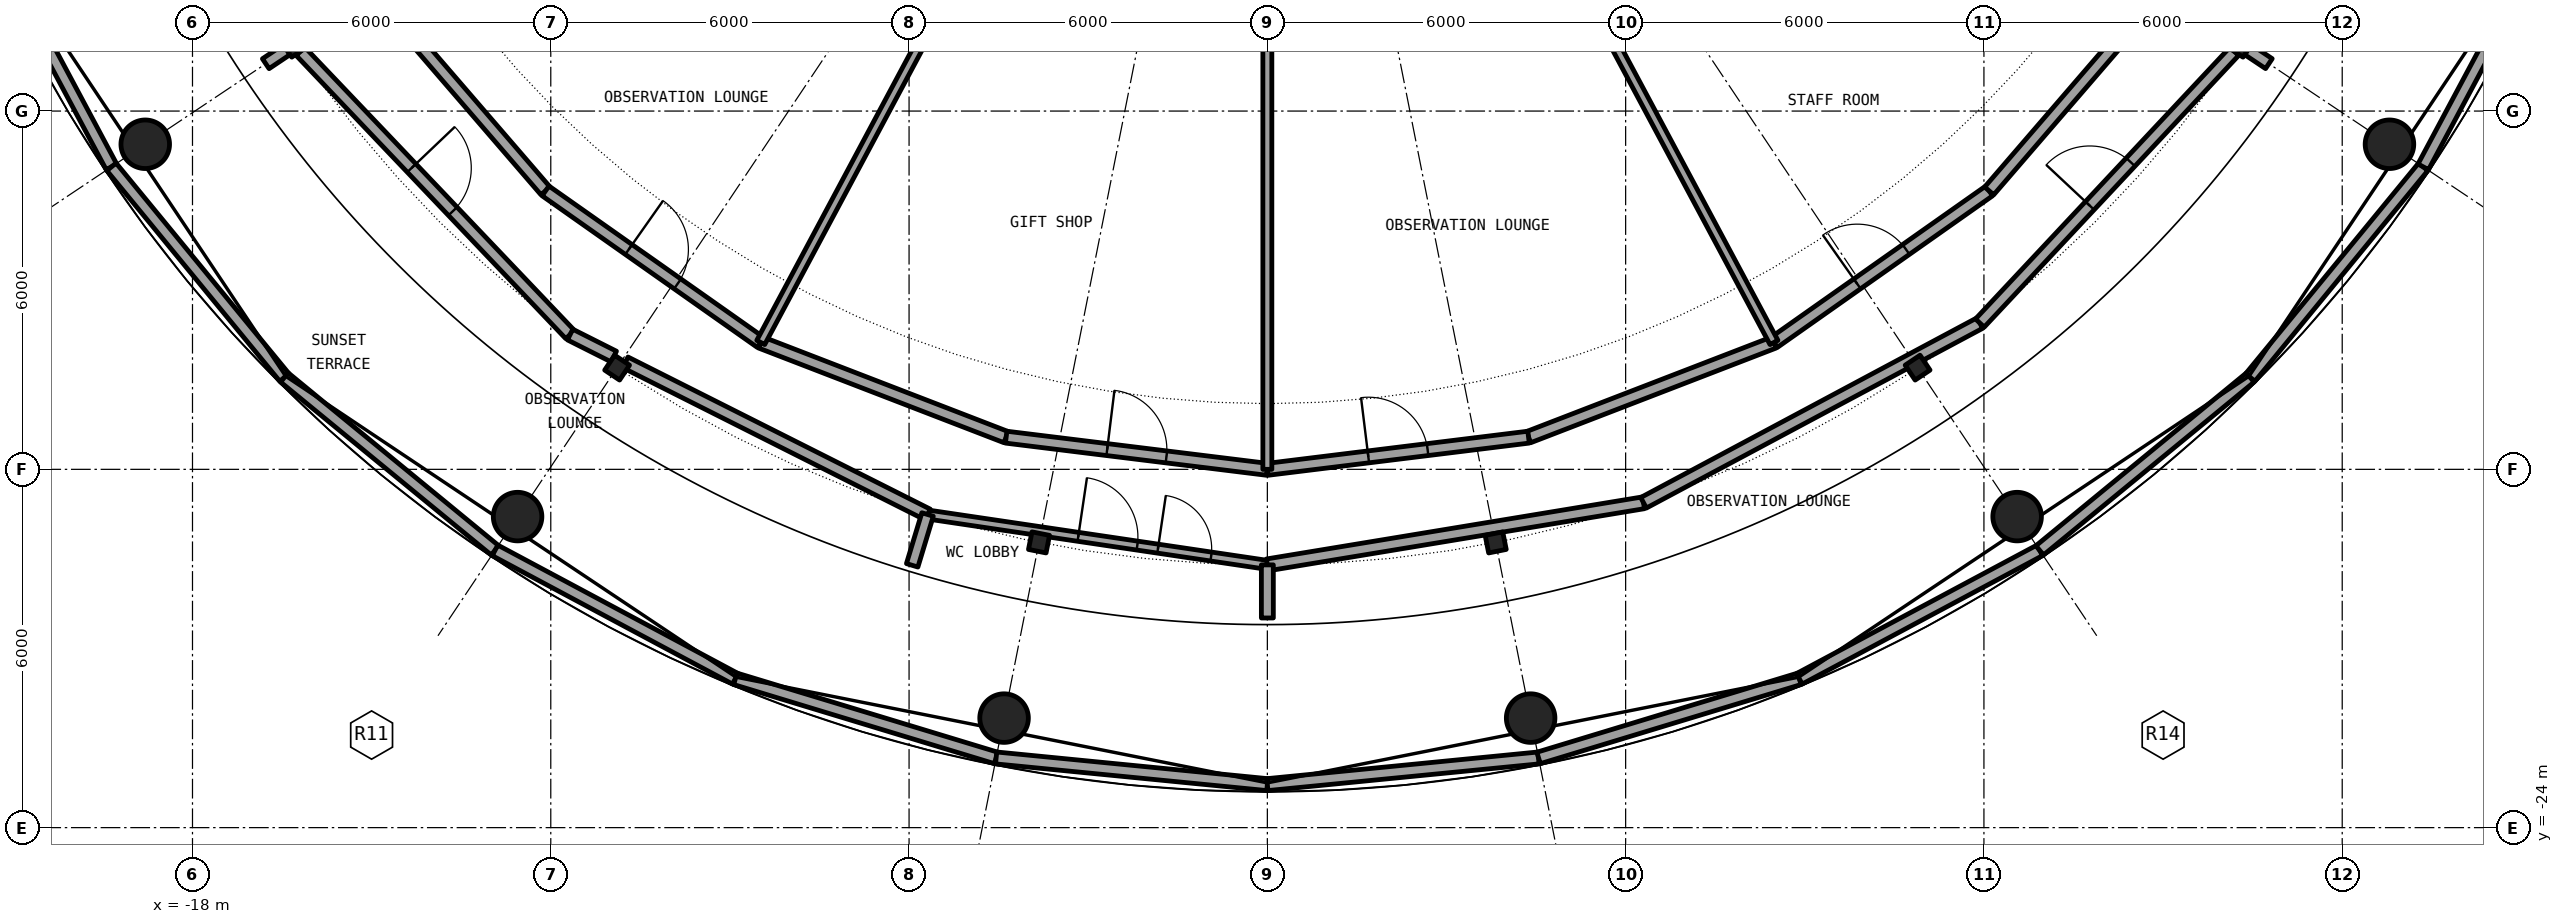
"""IFC4 building model, lengths in metres.
Left out: names, types, materials, properties, quantities, classifications, styles, units other than length and angle.
Written with IfcOpenShell. Run it as: python <this file> out.ifc"""

import sys

from ifc_helpers import new_model, si_unit, direction, frame, frame_2d, origin, origin_2d, place, context, subcontext, project, spatial, rectangle, hollow_circle, i_section, extrude, element, fill, save


model = new_model("IFC4")
c1 = context("Model", 3, precision=1e-05, world=origin(), true_north=direction((0.0, 1.0)))
c2 = subcontext(c1, "Body", "Model", "MODEL_VIEW")
j1 = project(units=[si_unit("LENGTHUNIT", "METRE"), si_unit("PLANEANGLEUNIT", "RADIAN")], contexts=[c1])
p1 = place(None, origin())
s1 = spatial("IfcSite", under=j1, at=p1, CompositionType="ELEMENT")
p2 = place(p1, origin())
s2 = spatial("IfcBuilding", under=s1, at=p2, CompositionType="ELEMENT")
p3 = place(p2, frame((0.0, 0.0, 255.4)))
s3 = spatial("IfcBuildingStorey", under=s2, at=p3, CompositionType="ELEMENT", Elevation=255.4)
for number, where, z_axis, x_axis in (
    (1, (-18.791, -12.556, 0.0), (0.0, 0.0, 1.0), (1.0, 0.0, 0.0)),
    (2, (-12.556, -18.791, 0.0), (0.0, 0.0, 1.0), (1.0, 0.0, 0.0)),
    (3, (-4.409, -22.166, 0.0), (0.0, 0.0, 1.0), (1.0, 0.0, 0.0)),
    (4, (4.409, -22.166, 0.0), (0.0, 0.0, 1.0), (1.0, 0.0, 0.0)),
    (5, (12.556, -18.791, 0.0), (0.0, 0.0, 1.0), (1.0, 0.0, 0.0)),
    (6, (18.791, -12.556, 0.0), (0.0, 0.0, 1.0), (1.0, 0.0, 0.0)),
):
    element("IfcColumn", number, at=place(p3, frame(where, z_axis=z_axis, x_axis=x_axis)), inside=s3, PredefinedType="COLUMN", context=c2, shape_type="SweptSolid", body=[
        extrude(hollow_circle(Radius=0.406, WallThickness=0.03, at=origin_2d()), origin(), (0.0, 0.0, 1.0), 6.1),
    ])
for number, where, z_axis, x_axis in (
    (7, (-16.297, -10.889, 0.0), (0.0, 0.0, 1.0), (-0.831, -0.556, 0.0)),
    (8, (-10.889, -16.297, 0.0), (0.0, 0.0, 1.0), (-0.556, -0.831, 0.0)),
    (9, (-3.824, -19.223, 0.0), (0.0, 0.0, 1.0), (-0.195, -0.981, 0.0)),
    (10, (3.824, -19.223, 0.0), (0.0, 0.0, 1.0), (0.195, -0.981, 0.0)),
    (11, (10.889, -16.297, 0.0), (0.0, 0.0, 1.0), (0.556, -0.831, 0.0)),
    (12, (16.297, -10.889, 0.0), (0.0, 0.0, 1.0), (0.831, -0.556, 0.0)),
):
    element("IfcColumn", number, at=place(p3, frame(where, z_axis=z_axis, x_axis=x_axis)), inside=s3, PredefinedType="COLUMN", context=c2, shape_type="SweptSolid", body=[
        extrude(i_section(OverallWidth=0.3, OverallDepth=0.3, WebThickness=0.011, FlangeThickness=0.019, FilletRadius=0.027, at=origin_2d()), origin(), (0.0, 0.0, 1.0), 6.1),
    ])
p4 = place(p3, frame((-21.508, -8.909, 6.1), z_axis=(0.0, 0.0, 1.0), x_axis=(0.471334945511, -0.881954289711, 0.0)))
e13 = element("IfcWall", 13, at=p4, inside=s3, PredefinedType="PARAPET", context=c2, shape_type="SweptSolid", body=[
    extrude(rectangle(XDim=4.564, YDim=0.2, at=frame_2d((2.282, 0.0))), origin(), (0.0, 0.0, 1.0), 1.1),
])
for number, where, z_axis, x_axis in (
    (14, (-19.357, -12.934, 6.1), (0.0, 0.0, 1.0), (0.635, -0.773, 0.0)),
    (15, (-16.461, -16.461, 6.1), (0.0, 0.0, 1.0), (0.773, -0.635, 0.0)),
):
    element("IfcWall", number, at=place(p3, frame(where, z_axis=z_axis, x_axis=x_axis)), inside=s3, PredefinedType="PARAPET", context=c2, shape_type="SweptSolid", body=[
        extrude(rectangle(XDim=4.563, YDim=0.2, at=frame_2d((2.282, 0.0))), origin(), (0.0, 0.0, 1.0), 1.1),
    ])
p5 = place(p3, frame((-12.934, -19.357, 6.1), z_axis=(0.0, 0.0, 1.0), x_axis=(0.881954289711, -0.471334945511, 0.0)))
e16 = element("IfcWall", 16, at=p5, inside=s3, PredefinedType="PARAPET", context=c2, shape_type="SweptSolid", body=[
    extrude(rectangle(XDim=4.564, YDim=0.2, at=frame_2d((2.282, 0.0))), origin(), (0.0, 0.0, 1.0), 1.1),
])
p6 = place(p3, frame((-8.909, -21.508, 6.1), z_axis=(0.0, 0.0, 1.0), x_axis=(0.956924910545, -0.29033552242, 0.0)))
e17 = element("IfcWall", 17, at=p6, inside=s3, PredefinedType="PARAPET", context=c2, shape_type="SweptSolid", body=[
    extrude(rectangle(XDim=4.563, YDim=0.2, at=frame_2d((2.282, 0.0))), origin(), (0.0, 0.0, 1.0), 1.1),
])
for number, where, z_axis, x_axis in (
    (18, (-4.542, -22.833, 6.1), (0.0, 0.0, 1.0), (0.995, -0.098, 0.0)),
    (19, (0.0, -23.28, 6.1), (0.0, 0.0, 1.0), (0.995, 0.098, 0.0)),
):
    element("IfcWall", number, at=place(p3, frame(where, z_axis=z_axis, x_axis=x_axis)), inside=s3, PredefinedType="PARAPET", context=c2, shape_type="SweptSolid", body=[
        extrude(rectangle(XDim=4.564, YDim=0.2, at=frame_2d((2.282, 0.0))), origin(), (0.0, 0.0, 1.0), 1.1),
    ])
p7 = place(p3, frame((4.542, -22.833, 6.1), z_axis=(0.0, 0.0, 1.0), x_axis=(0.956924910545, 0.29033552242, 0.0)))
e20 = element("IfcWall", 20, at=p7, inside=s3, PredefinedType="PARAPET", context=c2, shape_type="SweptSolid", body=[
    extrude(rectangle(XDim=4.563, YDim=0.2, at=frame_2d((2.282, 0.0))), origin(), (0.0, 0.0, 1.0), 1.1),
])
p8 = place(p3, frame((8.909, -21.508, 6.1), z_axis=(0.0, 0.0, 1.0), x_axis=(0.881954289711, 0.471334945511, 0.0)))
e21 = element("IfcWall", 21, at=p8, inside=s3, PredefinedType="PARAPET", context=c2, shape_type="SweptSolid", body=[
    extrude(rectangle(XDim=4.564, YDim=0.2, at=frame_2d((2.282, 0.0))), origin(), (0.0, 0.0, 1.0), 1.1),
])
for number, where, z_axis, x_axis in (
    (22, (12.934, -19.357, 6.1), (0.0, 0.0, 1.0), (0.773, 0.635, 0.0)),
    (23, (16.461, -16.461, 6.1), (0.0, 0.0, 1.0), (0.635, 0.773, 0.0)),
):
    element("IfcWall", number, at=place(p3, frame(where, z_axis=z_axis, x_axis=x_axis)), inside=s3, PredefinedType="PARAPET", context=c2, shape_type="SweptSolid", body=[
        extrude(rectangle(XDim=4.563, YDim=0.2, at=frame_2d((2.282, 0.0))), origin(), (0.0, 0.0, 1.0), 1.1),
    ])
p9 = place(p3, frame((19.357, -12.934, 6.1), z_axis=(0.0, 0.0, 1.0), x_axis=(0.471334945511, 0.881954289711, 0.0)))
e24 = element("IfcWall", 24, at=p9, inside=s3, PredefinedType="PARAPET", context=c2, shape_type="SweptSolid", body=[
    extrude(rectangle(XDim=4.564, YDim=0.2, at=frame_2d((2.282, 0.0))), origin(), (0.0, 0.0, 1.0), 1.1),
])
p10 = place(p3, frame((-5.69, -18.756, 0.0), z_axis=(0.0, 0.0, 1.0), x_axis=(0.989177240103, -0.146725552177, 0.0)))
e25 = element("IfcWall", 25, at=p10, inside=s3, PredefinedType="PARTITIONING", context=c2, shape_type="SweptSolid", body=[
    extrude(rectangle(XDim=5.752, YDim=0.15, at=frame_2d((2.876, 0.0))), origin(), (0.0, 0.0, 1.0), 5.5),
])
p11 = place(p10, frame((2.55, 0.0, 0.0)))
e26 = element("IfcOpeningElement", 26, at=p11, cuts=e25, PredefinedType="OPENING", context=c2, shape_type="SweptSolid", body=[
    extrude(rectangle(XDim=1.0, YDim=2.3, at=frame_2d((0.5, 1.15))), frame((0.0, 0.085, 0.0), z_axis=(0.0, -1.0, 0.0), x_axis=(1.0, 0.0, 0.0)), (0.0, 0.0, 1.0), 0.17),
])
p12 = place(p10, frame((3.9, 0.0, 0.0)))
e27 = element("IfcOpeningElement", 27, at=p12, cuts=e25, PredefinedType="OPENING", context=c2, shape_type="SweptSolid", body=[
    extrude(rectangle(XDim=0.9, YDim=2.3, at=frame_2d((0.45, 1.15))), frame((0.0, 0.085, 0.0), z_axis=(0.0, -1.0, 0.0), x_axis=(1.0, 0.0, 0.0)), (0.0, 0.0, 1.0), 0.17),
])
p13 = place(p3, frame((0.0, -19.6, 0.0), z_axis=(0.0, 0.0, 1.0), x_axis=(0.986645929742, 0.162879738837, 0.0)))
e28 = element("IfcWall", 28, at=p13, inside=s3, PredefinedType="PARTITIONING", context=c2, shape_type="SweptSolid", body=[
    extrude(rectangle(XDim=6.385, YDim=0.2, at=frame_2d((3.193, 0.0))), origin(), (0.0, 0.0, 1.0), 5.5),
])
p14 = place(p3, frame((6.3, -18.56, 0.0), z_axis=(0.0, 0.0, 1.0), x_axis=(0.88193879345, 0.471363940716, 0.0)))
e29 = element("IfcWall", 29, at=p14, inside=s3, PredefinedType="PARTITIONING", context=c2, shape_type="SweptSolid", body=[
    extrude(rectangle(XDim=6.386, YDim=0.2, at=frame_2d((3.193, 0.0))), origin(), (0.0, 0.0, 1.0), 5.5),
])
p15 = place(p3, frame((11.932, -15.55, 0.0), z_axis=(0.0, 0.0, 1.0), x_axis=(0.683561939148, 0.729892509448, 0.0)))
e30 = element("IfcWall", 30, at=p15, inside=s3, PredefinedType="PARTITIONING", context=c2, shape_type="SweptSolid", body=[
    extrude(rectangle(XDim=6.234, YDim=0.2, at=frame_2d((3.117, 0.0))), origin(), (0.0, 0.0, 1.0), 5.5),
])
p16 = place(p15, frame((2.693, 0.0, 0.0)))
e31 = element("IfcOpeningElement", 31, at=p16, cuts=e30, PredefinedType="OPENING", context=c2, shape_type="SweptSolid", body=[
    extrude(rectangle(XDim=1.0, YDim=2.3, at=frame_2d((0.5, 1.15))), frame((0.0, 0.11, 0.0), z_axis=(0.0, -1.0, 0.0), x_axis=(1.0, 0.0, 0.0)), (0.0, 0.0, 1.0), 0.22),
])
p17 = place(p3, frame((-16.192, -10.999, 0.0), z_axis=(0.0, 0.0, 1.0), x_axis=(0.689484820725, -0.724300132535, 0.0)))
e32 = element("IfcWall", 32, at=p17, inside=s3, PredefinedType="PARTITIONING", context=c2, shape_type="SweptSolid", body=[
    extrude(rectangle(XDim=6.55, YDim=0.2, at=frame_2d((3.275, 0.0))), origin(), (0.0, 0.0, 1.0), 5.5),
])
p18 = place(p17, frame((2.699, 0.0, 0.0)))
e33 = element("IfcOpeningElement", 33, at=p18, cuts=e32, PredefinedType="OPENING", context=c2, shape_type="SweptSolid", body=[
    extrude(rectangle(XDim=1.0, YDim=2.3, at=frame_2d((0.5, 1.15))), frame((0.0, 0.11, 0.0), z_axis=(0.0, -1.0, 0.0), x_axis=(1.0, 0.0, 0.0)), (0.0, 0.0, 1.0), 0.22),
])
p19 = place(p3, frame((-11.676, -15.743, 0.0), z_axis=(0.0, 0.0, 1.0), x_axis=(0.893110817984, -0.449836711263, 0.0)))
e34 = element("IfcWall", 34, at=p19, inside=s3, PredefinedType="PARTITIONING", context=c2, shape_type="SweptSolid", body=[
    extrude(rectangle(XDim=0.818, YDim=0.2, at=frame_2d((0.409, 0.0))), origin(), (0.0, 0.0, 1.0), 5.75),
])
p20 = place(p3, frame((-10.752, -16.208, 0.0), z_axis=(0.0, 0.0, 1.0), x_axis=(0.89321770158, -0.449624440599, 0.0)))
e35 = element("IfcWall", 35, at=p20, inside=s3, PredefinedType="PARTITIONING", context=c2, shape_type="SweptSolid", body=[
    extrude(rectangle(XDim=5.667, YDim=0.2, at=frame_2d((2.833, 0.0))), origin(), (0.0, 0.0, 1.0), 5.5),
])
for number, where, z_axis, x_axis in (
    (36, (-8.485, -15.875, 0.0), (0.0, 0.0, 1.0), (0.933, -0.36, 0.0)),
    (37, (4.374, -17.461, 0.0), (0.0, 0.0, 1.0), (0.933, 0.36, 0.0)),
):
    element("IfcWall", number, at=place(p3, frame(where, z_axis=z_axis, x_axis=x_axis)), inside=s3, PredefinedType="PARTITIONING", context=c2, shape_type="SweptSolid", body=[
        extrude(rectangle(XDim=4.406, YDim=0.2, at=frame_2d((2.203, 0.0))), origin(), (0.0, 0.0, 1.0), 5.75),
    ])
p21 = place(p3, frame((-15.613, -9.25, 0.0), z_axis=(0.0, 0.0, 1.0), x_axis=(0.653146301984, -0.757231740093, 0.0)))
e38 = element("IfcWall", 38, at=p21, inside=s3, PredefinedType="PARTITIONING", context=c2, shape_type="SweptSolid", body=[
    extrude(rectangle(XDim=5.397, YDim=0.2, at=frame_2d((2.699, 0.0))), origin(), (0.0, 0.0, 1.0), 5.75),
])
p22 = place(p3, frame((-12.088, -13.337, 0.0), z_axis=(0.0, 0.0, 1.0), x_axis=(0.817507922666, -0.575917352038, 0.0)))
e39 = element("IfcWall", 39, at=p22, inside=s3, PredefinedType="PARTITIONING", context=c2, shape_type="SweptSolid", body=[
    extrude(rectangle(XDim=4.407, YDim=0.2, at=frame_2d((2.204, 0.0))), origin(), (0.0, 0.0, 1.0), 5.75),
])
p23 = place(p22, frame((1.704, 0.0, 0.0)))
e40 = element("IfcOpeningElement", 40, at=p23, cuts=e39, PredefinedType="OPENING", context=c2, shape_type="SweptSolid", body=[
    extrude(rectangle(XDim=1.0, YDim=2.3, at=frame_2d((0.5, 1.15))), frame((0.0, 0.11, 0.0), z_axis=(0.0, -1.0, 0.0), x_axis=(1.0, 0.0, 0.0)), (0.0, 0.0, 1.0), 0.22),
])
p24 = place(p3, frame((-4.374, -17.461, 0.0), z_axis=(0.0, 0.0, 1.0), x_axis=(0.992491158779, -0.122316391973, 0.0)))
e41 = element("IfcWall", 41, at=p24, inside=s3, PredefinedType="PARTITIONING", context=c2, shape_type="SweptSolid", body=[
    extrude(rectangle(XDim=4.407, YDim=0.2, at=frame_2d((2.204, 0.0))), origin(), (0.0, 0.0, 1.0), 5.75),
])
p25 = place(p24, frame((1.704, 0.0, 0.0)))
e42 = element("IfcOpeningElement", 42, at=p25, cuts=e41, PredefinedType="OPENING", context=c2, shape_type="SweptSolid", body=[
    extrude(rectangle(XDim=1.0, YDim=2.3, at=frame_2d((0.5, 1.15))), frame((0.0, 0.11, 0.0), z_axis=(0.0, -1.0, 0.0), x_axis=(1.0, 0.0, 0.0)), (0.0, 0.0, 1.0), 0.22),
])
p26 = place(p3, frame((0.0, -18.0, 0.0), z_axis=(0.0, 0.0, 1.0), x_axis=(0.992491158779, 0.122316391973, 0.0)))
e43 = element("IfcWall", 43, at=p26, inside=s3, PredefinedType="PARTITIONING", context=c2, shape_type="SweptSolid", body=[
    extrude(rectangle(XDim=4.407, YDim=0.2, at=frame_2d((2.204, 0.0))), origin(), (0.0, 0.0, 1.0), 5.75),
])
p27 = place(p26, frame((1.704, 0.0, 0.0)))
e44 = element("IfcOpeningElement", 44, at=p27, cuts=e43, PredefinedType="OPENING", context=c2, shape_type="SweptSolid", body=[
    extrude(rectangle(XDim=1.0, YDim=2.3, at=frame_2d((0.5, 1.15))), frame((0.0, 0.11, 0.0), z_axis=(0.0, -1.0, 0.0), x_axis=(1.0, 0.0, 0.0)), (0.0, 0.0, 1.0), 0.22),
])
p28 = place(p3, frame((8.485, -15.875, 0.0), z_axis=(0.0, 0.0, 1.0), x_axis=(0.817507922666, 0.575917352038, 0.0)))
e45 = element("IfcWall", 45, at=p28, inside=s3, PredefinedType="PARTITIONING", context=c2, shape_type="SweptSolid", body=[
    extrude(rectangle(XDim=4.407, YDim=0.2, at=frame_2d((2.204, 0.0))), origin(), (0.0, 0.0, 1.0), 5.75),
])
p29 = place(p28, frame((1.704, 0.0, 0.0)))
e46 = element("IfcOpeningElement", 46, at=p29, cuts=e45, PredefinedType="OPENING", context=c2, shape_type="SweptSolid", body=[
    extrude(rectangle(XDim=1.0, YDim=2.3, at=frame_2d((0.5, 1.15))), frame((0.0, 0.11, 0.0), z_axis=(0.0, -1.0, 0.0), x_axis=(1.0, 0.0, 0.0)), (0.0, 0.0, 1.0), 0.22),
])
p30 = place(p3, frame((12.088, -13.337, 0.0), z_axis=(0.0, 0.0, 1.0), x_axis=(0.653146301984, 0.757231740093, 0.0)))
e47 = element("IfcWall", 47, at=p30, inside=s3, PredefinedType="PARTITIONING", context=c2, shape_type="SweptSolid", body=[
    extrude(rectangle(XDim=5.397, YDim=0.2, at=frame_2d((2.699, 0.0))), origin(), (0.0, 0.0, 1.0), 5.75),
])
p31 = place(p3, frame((-16.773, -11.207, 0.0), z_axis=(0.0, 0.0, 1.0), x_axis=(0.830713836596, 0.556699669201, 0.0)))
e48 = element("IfcWall", 48, at=p31, inside=s3, PredefinedType="PARTITIONING", context=c2, shape_type="SweptSolid", body=[
    extrude(rectangle(XDim=0.422, YDim=0.2, at=frame_2d((0.211, 0.0))), origin(), (0.0, 0.0, 1.0), 5.75),
])
p32 = place(p3, frame((-8.484, -15.875, 0.0), z_axis=(0.0, 0.0, 1.0), x_axis=(0.471365806418, 0.881937796299, 0.0)))
e49 = element("IfcWall", 49, at=p32, inside=s3, PredefinedType="PARTITIONING", context=c2, shape_type="SweptSolid", body=[
    extrude(rectangle(XDim=10.281, YDim=0.15, at=frame_2d((5.14, 0.0))), origin(), (0.0, 0.0, 1.0), 5.75),
])
p33 = place(p3, frame((-5.948, -19.607, 0.0), z_axis=(0.0, 0.0, 1.0), x_axis=(0.290243641717, 0.956952782766, 0.0)))
e50 = element("IfcWall", 50, at=p33, inside=s3, PredefinedType="PARTITIONING", context=c2, shape_type="SweptSolid", body=[
    extrude(rectangle(XDim=0.889, YDim=0.2, at=frame_2d((0.445, 0.0))), origin(), (0.0, 0.0, 1.0), 5.75),
])
p34 = place(p3, frame((0.0, -20.489, 0.0), z_axis=(0.0, 0.0, 1.0), x_axis=(0.0, 1.0, 0.0)))
e51 = element("IfcWall", 51, at=p34, inside=s3, PredefinedType="PARTITIONING", context=c2, shape_type="SweptSolid", body=[
    extrude(rectangle(XDim=0.889, YDim=0.2, at=frame_2d((0.444, 0.0))), origin(), (0.0, 0.0, 1.0), 5.75),
])
p35 = place(p3, frame((0.0, -18.0, 0.0), z_axis=(0.0, 0.0, 1.0), x_axis=(0.0, 1.0, 0.0)))
e52 = element("IfcWall", 52, at=p35, inside=s3, PredefinedType="PARTITIONING", context=c2, shape_type="SweptSolid", body=[
    extrude(rectangle(XDim=10.28, YDim=0.15, at=frame_2d((5.14, 0.0))), origin(), (0.0, 0.0, 1.0), 5.75),
])
p36 = place(p3, frame((3.638, -6.808, 0.0), z_axis=(0.0, 0.0, 1.0), x_axis=(0.471365806418, -0.881937796299, 0.0)))
e53 = element("IfcWall", 53, at=p36, inside=s3, PredefinedType="PARTITIONING", context=c2, shape_type="SweptSolid", body=[
    extrude(rectangle(XDim=10.281, YDim=0.15, at=frame_2d((5.14, 0.0))), origin(), (0.0, 0.0, 1.0), 5.75),
])
p37 = place(p3, frame((16.422, -10.972, 0.0), z_axis=(0.0, 0.0, 1.0), x_axis=(0.831067539056, -0.556171507296, 0.0)))
e54 = element("IfcWall", 54, at=p37, inside=s3, PredefinedType="PARTITIONING", context=c2, shape_type="SweptSolid", body=[
    extrude(rectangle(XDim=0.421, YDim=0.2, at=frame_2d((0.21, 0.0))), origin(), (0.0, 0.0, 1.0), 5.75),
])
p38 = place(p3, frame((0.0, 0.0, 5.75)))
p39 = place(p38, frame((-11.075, -19.182, 0.0)))
p40 = place(p39, frame((0.0, 0.0, 0.3)))
e55 = element("IfcWindow", 55, at=p40, inside=s3, PartitioningType="SINGLE_PANEL", PredefinedType="SKYLIGHT", context=c2, shape_type="SweptSolid", body=[
    extrude(rectangle(XDim=1.0, YDim=1.0, at=origin_2d()), origin(), (0.0, 0.0, 1.0), 0.05),
])
p41 = place(p38, frame((11.075, -19.182, 0.0)))
p42 = place(p41, frame((0.0, 0.0, 0.3)))
e56 = element("IfcWindow", 56, at=p42, inside=s3, PartitioningType="SINGLE_PANEL", PredefinedType="SKYLIGHT", context=c2, shape_type="SweptSolid", body=[
    extrude(rectangle(XDim=1.0, YDim=1.0, at=origin_2d()), origin(), (0.0, 0.0, 1.0), 0.05),
])
p43 = place(p11, origin())
e57 = element("IfcDoor", 57, at=p43, inside=s3, OperationType="SINGLE_SWING_RIGHT", PredefinedType="DOOR", context=c2, shape_type="SweptSolid", body=[
    extrude(rectangle(XDim=1.0, YDim=2.3, at=frame_2d((0.5, 1.15))), frame((0.0, 0.025, 0.0), z_axis=(0.0, -1.0, 0.0), x_axis=(1.0, 0.0, 0.0)), (0.0, 0.0, 1.0), 0.05),
])
fill(e26, e57)
p44 = place(p18, origin())
e58 = element("IfcDoor", 58, at=p44, inside=s3, OperationType="SINGLE_SWING_LEFT", PredefinedType="DOOR", context=c2, shape_type="SweptSolid", body=[
    extrude(rectangle(XDim=1.0, YDim=2.3, at=frame_2d((0.5, 1.15))), frame((0.0, 0.025, 0.0), z_axis=(0.0, -1.0, 0.0), x_axis=(1.0, 0.0, 0.0)), (0.0, 0.0, 1.0), 0.05),
])
fill(e33, e58)
p45 = place(p16, origin())
e59 = element("IfcDoor", 59, at=p45, inside=s3, OperationType="SINGLE_SWING_RIGHT", PredefinedType="DOOR", context=c2, shape_type="SweptSolid", body=[
    extrude(rectangle(XDim=1.0, YDim=2.3, at=frame_2d((0.5, 1.15))), frame((0.0, 0.025, 0.0), z_axis=(0.0, -1.0, 0.0), x_axis=(1.0, 0.0, 0.0)), (0.0, 0.0, 1.0), 0.05),
])
fill(e31, e59)
p46 = place(p23, origin())
e60 = element("IfcDoor", 60, at=p46, inside=s3, OperationType="SINGLE_SWING_RIGHT", PredefinedType="DOOR", context=c2, shape_type="SweptSolid", body=[
    extrude(rectangle(XDim=1.0, YDim=2.3, at=frame_2d((0.5, 1.15))), frame((0.0, 0.025, 0.0), z_axis=(0.0, -1.0, 0.0), x_axis=(1.0, 0.0, 0.0)), (0.0, 0.0, 1.0), 0.05),
])
fill(e40, e60)
p47 = place(p25, origin())
e61 = element("IfcDoor", 61, at=p47, inside=s3, OperationType="SINGLE_SWING_LEFT", PredefinedType="DOOR", context=c2, shape_type="SweptSolid", body=[
    extrude(rectangle(XDim=1.0, YDim=2.3, at=frame_2d((0.5, 1.15))), frame((0.0, 0.025, 0.0), z_axis=(0.0, -1.0, 0.0), x_axis=(1.0, 0.0, 0.0)), (0.0, 0.0, 1.0), 0.05),
])
fill(e42, e61)
p48 = place(p27, origin())
e62 = element("IfcDoor", 62, at=p48, inside=s3, OperationType="SINGLE_SWING_RIGHT", PredefinedType="DOOR", context=c2, shape_type="SweptSolid", body=[
    extrude(rectangle(XDim=1.0, YDim=2.3, at=frame_2d((0.5, 1.15))), frame((0.0, 0.025, 0.0), z_axis=(0.0, -1.0, 0.0), x_axis=(1.0, 0.0, 0.0)), (0.0, 0.0, 1.0), 0.05),
])
fill(e44, e62)
p49 = place(p29, origin())
e63 = element("IfcDoor", 63, at=p49, inside=s3, OperationType="SINGLE_SWING_RIGHT", PredefinedType="DOOR", context=c2, shape_type="SweptSolid", body=[
    extrude(rectangle(XDim=1.0, YDim=2.3, at=frame_2d((0.5, 1.15))), frame((0.0, 0.025, 0.0), z_axis=(0.0, -1.0, 0.0), x_axis=(1.0, 0.0, 0.0)), (0.0, 0.0, 1.0), 0.05),
])
fill(e46, e63)
p50 = place(p12, origin())
e64 = element("IfcDoor", 64, at=p50, inside=s3, OperationType="SINGLE_SWING_RIGHT", PredefinedType="DOOR", context=c2, shape_type="SweptSolid", body=[
    extrude(rectangle(XDim=0.9, YDim=2.3, at=frame_2d((0.45, 1.15))), frame((0.0, 0.025, 0.0), z_axis=(0.0, -1.0, 0.0), x_axis=(1.0, 0.0, 0.0)), (0.0, 0.0, 1.0), 0.05),
])
fill(e27, e64)
save(model, sys.argv[1])
